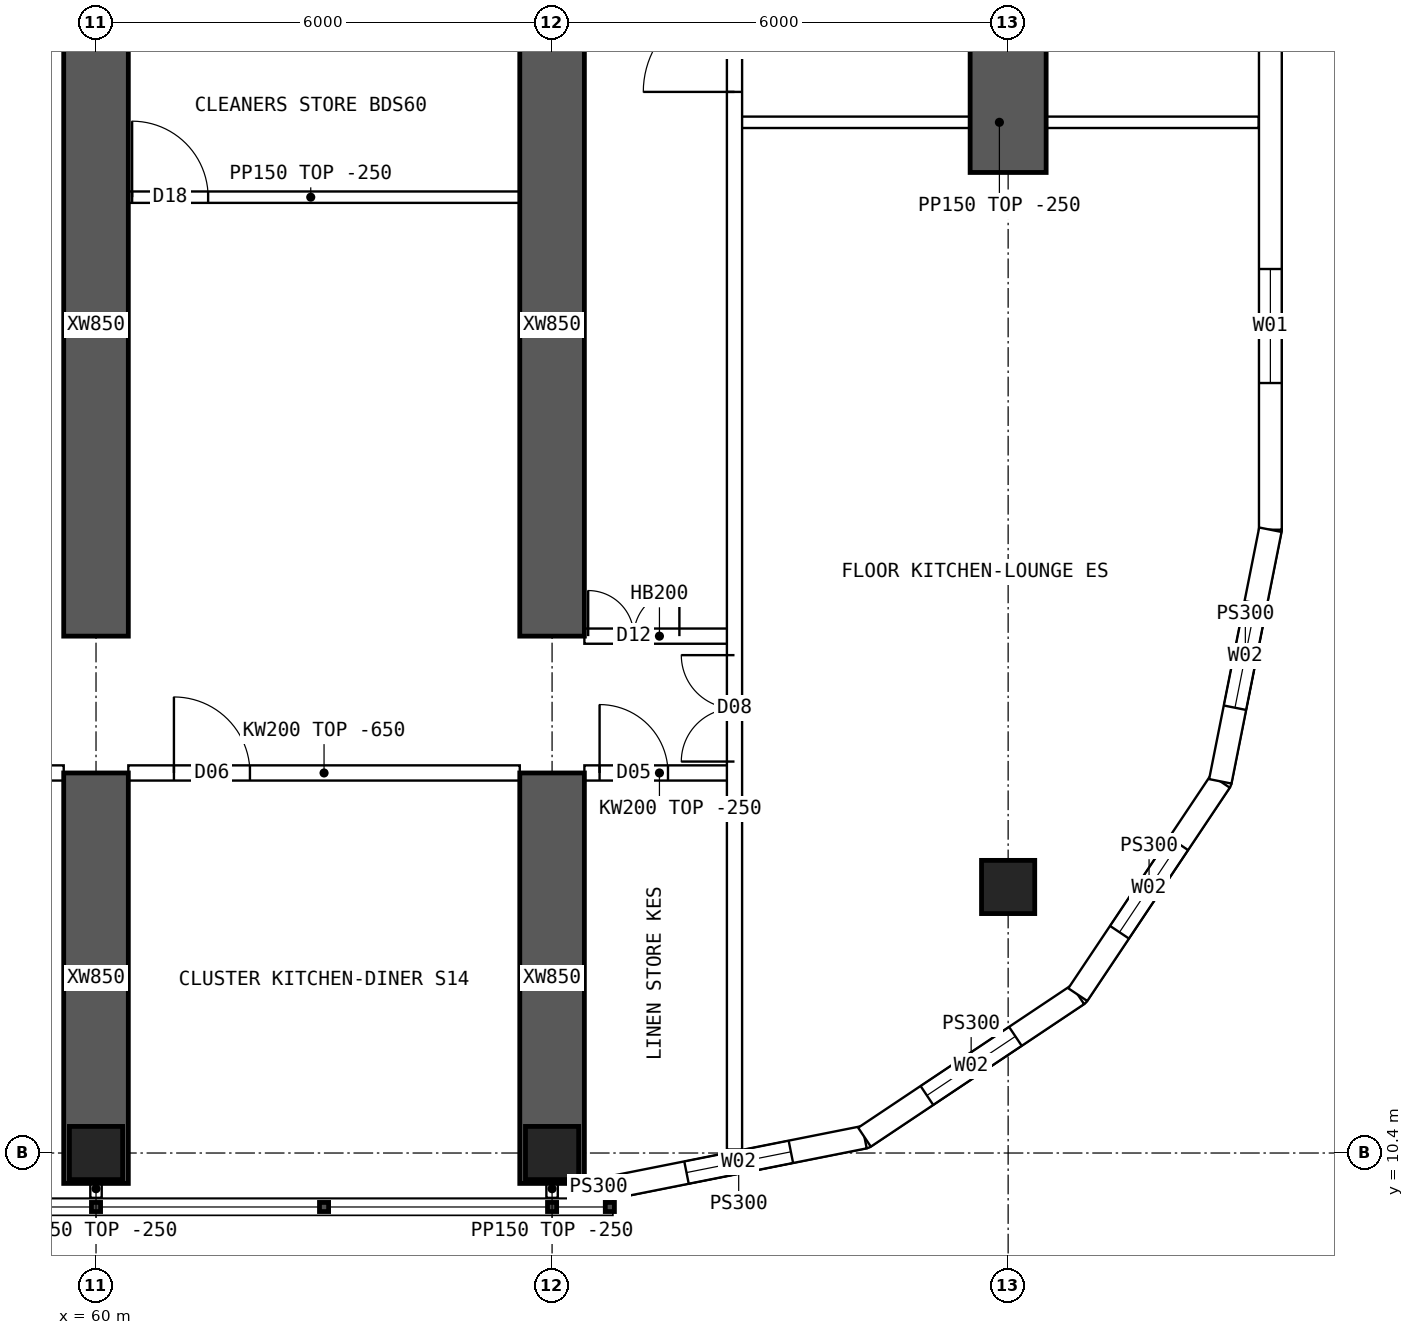
"""IFC4 building model, lengths in metres.
Left out: names, types, materials, properties, quantities, classifications, styles, units other than length and angle.
Written with IfcOpenShell. Run it as: python <this file> out.ifc"""

import sys

from ifc_helpers import new_model, si_unit, direction, frame, frame_2d, origin, origin_2d, place, context, subcontext, project, spatial, polyline, rectangle, hollow_rectangle, outline, extrude, element, fill, save


model = new_model("IFC4")
c1 = context("Model", 3, precision=1e-05, world=origin(), true_north=direction((0.0, 1.0)))
c2 = subcontext(c1, "Body", "Model", "MODEL_VIEW")
j1 = project(units=[si_unit("LENGTHUNIT", "METRE"), si_unit("PLANEANGLEUNIT", "RADIAN")], contexts=[c1])
p1 = place(None, origin())
s1 = spatial("IfcSite", under=j1, at=p1, CompositionType="ELEMENT")
p2 = place(p1, origin())
s2 = spatial("IfcBuilding", under=s1, at=p2, CompositionType="ELEMENT")
p3 = place(p2, frame((0.0, 0.0, 156.1)))
s3 = spatial("IfcBuildingStorey", under=s2, at=p3, CompositionType="ELEMENT", Elevation=156.1)
for number, where, z_axis, x_axis in (
    (1, (60.0, 10.4, 0.0), (0.0, 0.0, 1.0), (1.0, 0.0, 0.0)),
    (2, (66.0, 10.4, 0.0), (0.0, 0.0, 1.0), (1.0, 0.0, 0.0)),
    (3, (72.0, 13.9, 0.0), (0.0, 0.0, 1.0), (1.0, 0.0, 0.0)),
):
    element("IfcColumn", number, at=place(p3, frame(where, z_axis=z_axis, x_axis=x_axis)), inside=s3, PredefinedType="COLUMN", context=c2, shape_type="SweptSolid", body=[
        extrude(hollow_rectangle(XDim=0.7, YDim=0.7, WallThickness=0.07, at=origin_2d()), origin(), (0.0, 0.0, 1.0), 3.75),
    ])
p4 = place(p3, frame((72.0, 23.3, 0.0), z_axis=(0.0, 0.0, 1.0), x_axis=(0.0, 1.0, 0.0)))
e4 = element("IfcWall", 4, at=p4, inside=s3, PredefinedType="SHEAR", context=c2, shape_type="SweptSolid", body=[
    extrude(rectangle(XDim=5.0, YDim=1.0, at=frame_2d((2.5, 0.0))), origin(), (0.0, 0.0, 1.0), 3.75),
])
p5 = place(p3, frame((60.0, 10.0, 0.0), z_axis=(0.0, 0.0, 1.0), x_axis=(0.0, 1.0, 0.0)))
e5 = element("IfcWall", 5, at=p5, inside=s3, PredefinedType="SHEAR", context=c2, shape_type="SweptSolid", body=[
    extrude(rectangle(XDim=5.4, YDim=0.85, at=frame_2d((2.7, 0.0))), origin(), (0.0, 0.0, 1.0), 3.75),
])
p6 = place(p3, frame((60.0, 17.2, 0.0), z_axis=(0.0, 0.0, 1.0), x_axis=(0.0, 1.0, 0.0)))
e6 = element("IfcWall", 6, at=p6, inside=s3, PredefinedType="SHEAR", context=c2, shape_type="SweptSolid", body=[
    extrude(rectangle(XDim=8.175, YDim=0.85, at=frame_2d((4.087, 0.0))), origin(), (0.0, 0.0, 1.0), 3.75),
])
p7 = place(p3, frame((66.0, 10.0, 0.0), z_axis=(0.0, 0.0, 1.0), x_axis=(0.0, 1.0, 0.0)))
e7 = element("IfcWall", 7, at=p7, inside=s3, PredefinedType="SHEAR", context=c2, shape_type="SweptSolid", body=[
    extrude(rectangle(XDim=5.4, YDim=0.85, at=frame_2d((2.7, 0.0))), origin(), (0.0, 0.0, 1.0), 3.75),
])
p8 = place(p3, frame((66.0, 17.2, 0.0), z_axis=(0.0, 0.0, 1.0), x_axis=(0.0, 1.0, 0.0)))
e8 = element("IfcWall", 8, at=p8, inside=s3, PredefinedType="SHEAR", context=c2, shape_type="SweptSolid", body=[
    extrude(rectangle(XDim=8.175, YDim=0.85, at=frame_2d((4.087, 0.0))), origin(), (0.0, 0.0, 1.0), 3.75),
])
p9 = place(p3, frame((75.45, 18.6, 0.0), z_axis=(0.0, 0.0, 1.0), x_axis=(0.0, 1.0, 0.0)))
e9 = element("IfcWall", 9, at=p9, inside=s3, PredefinedType="SOLIDWALL", context=c2, shape_type="SweptSolid", body=[
    extrude(outline(polyline([(-0.015, -0.15), (26.815, -0.15), (26.785, 0.15), (0.015, 0.15), (-0.015, -0.15)])), origin(), (0.0, 0.0, 1.0), 3.5),
])
p10 = place(p9, frame((1.93, 0.0, 0.9)))
e10 = element("IfcOpeningElement", 10, at=p10, cuts=e9, PredefinedType="OPENING", context=c2, shape_type="SweptSolid", body=[
    extrude(rectangle(XDim=1.5, YDim=2.0, at=frame_2d((0.75, 1.0))), frame((0.0, 0.16, 0.0), z_axis=(0.0, -1.0, 0.0), x_axis=(1.0, 0.0, 0.0)), (0.0, 0.0, 1.0), 0.32),
])
p11 = place(p9, frame((7.29, 0.0, 0.9)))
e11 = element("IfcOpeningElement", 11, at=p11, cuts=e9, PredefinedType="OPENING", context=c2, shape_type="SweptSolid", body=[
    extrude(rectangle(XDim=1.5, YDim=2.0, at=frame_2d((0.75, 1.0))), frame((0.0, 0.16, 0.0), z_axis=(0.0, -1.0, 0.0), x_axis=(1.0, 0.0, 0.0)), (0.0, 0.0, 1.0), 0.32),
])
p12 = place(p9, frame((12.65, 0.0, 0.9)))
e12 = element("IfcOpeningElement", 12, at=p12, cuts=e9, PredefinedType="OPENING", context=c2, shape_type="SweptSolid", body=[
    extrude(rectangle(XDim=1.5, YDim=2.0, at=frame_2d((0.75, 1.0))), frame((0.0, 0.16, 0.0), z_axis=(0.0, -1.0, 0.0), x_axis=(1.0, 0.0, 0.0)), (0.0, 0.0, 1.0), 0.32),
])
p13 = place(p9, frame((18.01, 0.0, 0.9)))
e13 = element("IfcOpeningElement", 13, at=p13, cuts=e9, PredefinedType="OPENING", context=c2, shape_type="SweptSolid", body=[
    extrude(rectangle(XDim=1.5, YDim=2.0, at=frame_2d((0.75, 1.0))), frame((0.0, 0.16, 0.0), z_axis=(0.0, -1.0, 0.0), x_axis=(1.0, 0.0, 0.0)), (0.0, 0.0, 1.0), 0.32),
])
p14 = place(p9, frame((23.37, 0.0, 0.9)))
e14 = element("IfcOpeningElement", 14, at=p14, cuts=e9, PredefinedType="OPENING", context=c2, shape_type="SweptSolid", body=[
    extrude(rectangle(XDim=1.5, YDim=2.0, at=frame_2d((0.75, 1.0))), frame((0.0, 0.16, 0.0), z_axis=(0.0, -1.0, 0.0), x_axis=(1.0, 0.0, 0.0)), (0.0, 0.0, 1.0), 0.32),
])
p15 = place(p3, frame((66.8, 9.95, 0.0), z_axis=(0.0, 0.0, 1.0), x_axis=(0.98078325777, 0.195100490205, 0.0)))
e15 = element("IfcWall", 15, at=p15, inside=s3, PredefinedType="SOLIDWALL", context=c2, shape_type="SweptSolid", body=[
    extrude(outline(polyline([(-0.03, -0.15), (3.405, -0.15), (3.345, 0.15), (0.03, 0.15), (-0.03, -0.15)])), origin(), (0.0, 0.0, 1.0), 3.5),
])
p16 = place(p15, frame((0.988, 0.0, 0.9)))
e16 = element("IfcOpeningElement", 16, at=p16, cuts=e15, PredefinedType="OPENING", context=c2, shape_type="SweptSolid", body=[
    extrude(rectangle(XDim=1.4, YDim=1.8, at=frame_2d((0.7, 0.9))), frame((0.0, 0.16, 0.0), z_axis=(0.0, -1.0, 0.0), x_axis=(1.0, 0.0, 0.0)), (0.0, 0.0, 1.0), 0.32),
])
p17 = place(p3, frame((70.11, 10.608, 0.0), z_axis=(0.0, 0.0, 1.0), x_axis=(0.831493450887, 0.555534554399, 0.0)))
e17 = element("IfcWall", 17, at=p17, inside=s3, PredefinedType="SOLIDWALL", context=c2, shape_type="SweptSolid", body=[
    extrude(outline(polyline([(-0.03, -0.15), (3.405, -0.15), (3.345, 0.15), (0.03, 0.15), (-0.03, -0.15)])), origin(), (0.0, 0.0, 1.0), 3.5),
])
p18 = place(p17, frame((0.988, 0.0, 0.9)))
e18 = element("IfcOpeningElement", 18, at=p18, cuts=e17, PredefinedType="OPENING", context=c2, shape_type="SweptSolid", body=[
    extrude(rectangle(XDim=1.4, YDim=1.8, at=frame_2d((0.7, 0.9))), frame((0.0, 0.16, 0.0), z_axis=(0.0, -1.0, 0.0), x_axis=(1.0, 0.0, 0.0)), (0.0, 0.0, 1.0), 0.32),
])
p19 = place(p3, frame((72.917, 12.483, 0.0), z_axis=(0.0, 0.0, 1.0), x_axis=(0.555534554399, 0.831493450887, 0.0)))
e19 = element("IfcWall", 19, at=p19, inside=s3, PredefinedType="SOLIDWALL", context=c2, shape_type="SweptSolid", body=[
    extrude(outline(polyline([(-0.03, -0.15), (3.405, -0.15), (3.345, 0.15), (0.03, 0.15), (-0.03, -0.15)])), origin(), (0.0, 0.0, 1.0), 3.5),
])
p20 = place(p19, frame((0.988, 0.0, 0.9)))
e20 = element("IfcOpeningElement", 20, at=p20, cuts=e19, PredefinedType="OPENING", context=c2, shape_type="SweptSolid", body=[
    extrude(rectangle(XDim=1.4, YDim=1.8, at=frame_2d((0.7, 0.9))), frame((0.0, 0.16, 0.0), z_axis=(0.0, -1.0, 0.0), x_axis=(1.0, 0.0, 0.0)), (0.0, 0.0, 1.0), 0.32),
])
p21 = place(p3, frame((74.792, 15.29, 0.0), z_axis=(0.0, 0.0, 1.0), x_axis=(0.19508664885, 0.980786011034, 0.0)))
e21 = element("IfcWall", 21, at=p21, inside=s3, PredefinedType="SOLIDWALL", context=c2, shape_type="SweptSolid", body=[
    extrude(outline(polyline([(-0.03, -0.15), (3.39, -0.15), (3.36, 0.15), (0.03, 0.15), (-0.03, -0.15)])), origin(), (0.0, 0.0, 1.0), 3.5),
])
p22 = place(p21, frame((0.988, 0.0, 0.9)))
e22 = element("IfcOpeningElement", 22, at=p22, cuts=e21, PredefinedType="OPENING", context=c2, shape_type="SweptSolid", body=[
    extrude(rectangle(XDim=1.4, YDim=1.8, at=frame_2d((0.7, 0.9))), frame((0.0, 0.16, 0.0), z_axis=(0.0, -1.0, 0.0), x_axis=(1.0, 0.0, 0.0)), (0.0, 0.0, 1.0), 0.32),
])
p23 = place(p3, frame((66.8, 9.95, 0.0), z_axis=(0.0, 0.0, 1.0), x_axis=(-1.0, 0.0, 0.0)))
e23 = element("IfcWall", 23, at=p23, inside=s3, PredefinedType="SOLIDWALL", context=c2, shape_type="SweptSolid", body=[
    extrude(rectangle(XDim=0.375, YDim=0.3, at=frame_2d((0.188, 0.0))), origin(), (0.0, 0.0, 1.0), 3.5),
])
p24 = place(p3, frame((54.425, 15.4, 0.0), z_axis=(0.0, 0.0, 1.0), x_axis=(1.0, 0.0, 0.0)))
e24 = element("IfcWall", 24, at=p24, inside=s3, PredefinedType="SOLIDWALL", context=c2, shape_type="SweptSolid", body=[
    extrude(outline(polyline([(0.0, 0.0), (5.15, 0.0), (5.15, 3.1), (0.0, 3.1), (0.0, 0.0)])), frame((0.0, 0.1, 0.0), z_axis=(0.0, -1.0, 0.0), x_axis=(1.0, 0.0, 0.0)), (0.0, 0.0, 1.0), 0.2),
])
p25 = place(p24, frame((2.6, 0.0, 0.0)))
e25 = element("IfcOpeningElement", 25, at=p25, cuts=e24, PredefinedType="OPENING", context=c2, shape_type="SweptSolid", body=[
    extrude(rectangle(XDim=0.9, YDim=2.1, at=frame_2d((0.45, 1.05))), frame((0.0, 0.11, 0.0), z_axis=(0.0, -1.0, 0.0), x_axis=(1.0, 0.0, 0.0)), (0.0, 0.0, 1.0), 0.22),
])
p26 = place(p3, frame((60.425, 15.4, 0.0), z_axis=(0.0, 0.0, 1.0), x_axis=(1.0, 0.0, 0.0)))
e26 = element("IfcWall", 26, at=p26, inside=s3, PredefinedType="SOLIDWALL", context=c2, shape_type="SweptSolid", body=[
    extrude(outline(polyline([(0.0, 0.0), (5.15, 0.0), (5.15, 3.1), (0.0, 3.1), (0.0, 0.0)])), frame((0.0, 0.1, 0.0), z_axis=(0.0, -1.0, 0.0), x_axis=(1.0, 0.0, 0.0)), (0.0, 0.0, 1.0), 0.2),
])
p27 = place(p26, frame((0.6, 0.0, 0.0)))
e27 = element("IfcOpeningElement", 27, at=p27, cuts=e26, PredefinedType="OPENING", context=c2, shape_type="SweptSolid", body=[
    extrude(rectangle(XDim=1.0, YDim=2.1, at=frame_2d((0.5, 1.05))), frame((0.0, 0.11, 0.0), z_axis=(0.0, -1.0, 0.0), x_axis=(1.0, 0.0, 0.0)), (0.0, 0.0, 1.0), 0.22),
])
p28 = place(p3, frame((66.425, 15.4, 0.0), z_axis=(0.0, 0.0, 1.0), x_axis=(1.0, 0.0, 0.0)))
e28 = element("IfcWall", 28, at=p28, inside=s3, PredefinedType="SOLIDWALL", context=c2, shape_type="SweptSolid", body=[
    extrude(rectangle(XDim=1.975, YDim=0.2, at=frame_2d((0.987, 0.0))), origin(), (0.0, 0.0, 1.0), 3.5),
])
p29 = place(p28, frame((0.2, 0.0, 0.0)))
e29 = element("IfcOpeningElement", 29, at=p29, cuts=e28, PredefinedType="OPENING", context=c2, shape_type="SweptSolid", body=[
    extrude(rectangle(XDim=0.9, YDim=2.1, at=frame_2d((0.45, 1.05))), frame((0.0, 0.11, 0.0), z_axis=(0.0, -1.0, 0.0), x_axis=(1.0, 0.0, 0.0)), (0.0, 0.0, 1.0), 0.22),
])
p30 = place(p3, frame((66.425, 17.2, 0.0), z_axis=(0.0, 0.0, 1.0), x_axis=(1.0, 0.0, 0.0)))
e30 = element("IfcWall", 30, at=p30, inside=s3, PredefinedType="SOLIDWALL", context=c2, shape_type="SweptSolid", body=[
    extrude(rectangle(XDim=1.975, YDim=0.2, at=frame_2d((0.987, 0.0))), origin(), (0.0, 0.0, 1.0), 3.5),
])
p31 = place(p30, frame((0.05, 0.0, 0.0)))
e31 = element("IfcOpeningElement", 31, at=p31, cuts=e30, PredefinedType="OPENING", context=c2, shape_type="SweptSolid", body=[
    extrude(rectangle(XDim=1.2, YDim=2.1, at=frame_2d((0.6, 1.05))), frame((0.0, 0.11, 0.0), z_axis=(0.0, -1.0, 0.0), x_axis=(1.0, 0.0, 0.0)), (0.0, 0.0, 1.0), 0.22),
])
p32 = place(p3, frame((60.075, 22.975, 0.0), z_axis=(0.0, 0.0, 1.0), x_axis=(1.0, 0.0, 0.0)))
e32 = element("IfcWall", 32, at=p32, inside=s3, PredefinedType="PARTITIONING", context=c2, shape_type="SweptSolid", body=[
    extrude(rectangle(XDim=5.5, YDim=0.15, at=frame_2d((2.75, 0.0))), origin(), (0.0, 0.0, 1.0), 3.5),
])
p33 = place(p32, frame((0.4, 0.0, 0.0)))
e33 = element("IfcOpeningElement", 33, at=p33, cuts=e32, PredefinedType="OPENING", context=c2, shape_type="SweptSolid", body=[
    extrude(rectangle(XDim=1.0, YDim=2.1, at=frame_2d((0.5, 1.05))), frame((0.0, 0.085, 0.0), z_axis=(0.0, -1.0, 0.0), x_axis=(1.0, 0.0, 0.0)), (0.0, 0.0, 1.0), 0.17),
])
p34 = place(p3, frame((68.4, 10.446, 0.0), z_axis=(0.0, 0.0, 1.0), x_axis=(0.0, 1.0, 0.0)))
e34 = element("IfcWall", 34, at=p34, inside=s3, PredefinedType="SOLIDWALL", context=c2, shape_type="SweptSolid", body=[
    extrude(rectangle(XDim=43.107, YDim=0.2, at=frame_2d((21.554, 0.0))), origin(), (0.0, 0.0, 1.0), 3.5),
])
p35 = place(p34, frame((13.914, 0.0, 0.0)))
e35 = element("IfcOpeningElement", 35, at=p35, cuts=e34, PredefinedType="OPENING", context=c2, shape_type="SweptSolid", body=[
    extrude(rectangle(XDim=1.2, YDim=2.1, at=frame_2d((0.6, 1.05))), frame((0.0, 0.11, 0.0), z_axis=(0.0, -1.0, 0.0), x_axis=(1.0, 0.0, 0.0)), (0.0, 0.0, 1.0), 0.22),
])
p36 = place(p34, frame((22.634, 0.0, 0.0)))
e36 = element("IfcOpeningElement", 36, at=p36, cuts=e34, PredefinedType="OPENING", context=c2, shape_type="SweptSolid", body=[
    extrude(rectangle(XDim=1.2, YDim=2.1, at=frame_2d((0.6, 1.05))), frame((0.0, 0.11, 0.0), z_axis=(0.0, -1.0, 0.0), x_axis=(1.0, 0.0, 0.0)), (0.0, 0.0, 1.0), 0.22),
])
p37 = place(p34, frame((5.104, 0.0, 0.0)))
e37 = element("IfcOpeningElement", 37, at=p37, cuts=e34, PredefinedType="OPENING", context=c2, shape_type="SweptSolid", body=[
    extrude(rectangle(XDim=1.4, YDim=2.1, at=frame_2d((0.7, 1.05))), frame((0.0, 0.11, 0.0), z_axis=(0.0, -1.0, 0.0), x_axis=(1.0, 0.0, 0.0)), (0.0, 0.0, 1.0), 0.22),
])
p38 = place(p34, frame((36.504, 0.0, 0.0)))
e38 = element("IfcOpeningElement", 38, at=p38, cuts=e34, PredefinedType="OPENING", context=c2, shape_type="SweptSolid", body=[
    extrude(rectangle(XDim=1.4, YDim=2.1, at=frame_2d((0.7, 1.05))), frame((0.0, 0.11, 0.0), z_axis=(0.0, -1.0, 0.0), x_axis=(1.0, 0.0, 0.0)), (0.0, 0.0, 1.0), 0.22),
])
p39 = place(p3, frame((68.475, 23.96, 0.0), z_axis=(0.0, 0.0, 1.0), x_axis=(1.0, 0.0, 0.0)))
e39 = element("IfcWall", 39, at=p39, inside=s3, PredefinedType="PARTITIONING", context=c2, shape_type="SweptSolid", body=[
    extrude(rectangle(XDim=6.82, YDim=0.15, at=frame_2d((3.41, 0.0))), origin(), (0.0, 0.0, 1.0), 3.5),
])
for number, where, z_axis, x_axis in (
    (40, (60.0, 10.05, 0.0), (0.0, 0.0, 1.0), (0.0, -1.0, 0.0)),
    (41, (66.0, 10.05, 0.0), (0.0, 0.0, 1.0), (0.0, -1.0, 0.0)),
):
    element("IfcWall", number, at=place(p3, frame(where, z_axis=z_axis, x_axis=x_axis)), inside=s3, PredefinedType="PARTITIONING", context=c2, shape_type="SweptSolid", body=[
        extrude(rectangle(XDim=0.24, YDim=0.15, at=frame_2d((0.12, 0.0))), origin(), (0.0, 0.0, 1.0), 3.5),
    ])
p40 = place(p10, origin())
e42 = element("IfcWindow", 42, at=p40, inside=s3, PartitioningType="SINGLE_PANEL", PredefinedType="WINDOW", context=c2, shape_type="SweptSolid", body=[
    extrude(rectangle(XDim=1.5, YDim=2.0, at=frame_2d((0.75, 1.0))), frame((0.0, 0.03, 0.0), z_axis=(0.0, -1.0, 0.0), x_axis=(1.0, 0.0, 0.0)), (0.0, 0.0, 1.0), 0.06),
])
fill(e10, e42)
p41 = place(p16, origin())
e43 = element("IfcWindow", 43, at=p41, inside=s3, PartitioningType="SINGLE_PANEL", PredefinedType="WINDOW", context=c2, shape_type="SweptSolid", body=[
    extrude(rectangle(XDim=1.4, YDim=1.8, at=frame_2d((0.7, 0.9))), frame((0.0, 0.03, 0.0), z_axis=(0.0, -1.0, 0.0), x_axis=(1.0, 0.0, 0.0)), (0.0, 0.0, 1.0), 0.06),
])
fill(e16, e43)
p42 = place(p18, origin())
e44 = element("IfcWindow", 44, at=p42, inside=s3, PartitioningType="SINGLE_PANEL", PredefinedType="WINDOW", context=c2, shape_type="SweptSolid", body=[
    extrude(rectangle(XDim=1.4, YDim=1.8, at=frame_2d((0.7, 0.9))), frame((0.0, 0.03, 0.0), z_axis=(0.0, -1.0, 0.0), x_axis=(1.0, 0.0, 0.0)), (0.0, 0.0, 1.0), 0.06),
])
fill(e18, e44)
p43 = place(p20, origin())
e45 = element("IfcWindow", 45, at=p43, inside=s3, PartitioningType="SINGLE_PANEL", PredefinedType="WINDOW", context=c2, shape_type="SweptSolid", body=[
    extrude(rectangle(XDim=1.4, YDim=1.8, at=frame_2d((0.7, 0.9))), frame((0.0, 0.03, 0.0), z_axis=(0.0, -1.0, 0.0), x_axis=(1.0, 0.0, 0.0)), (0.0, 0.0, 1.0), 0.06),
])
fill(e20, e45)
p44 = place(p22, origin())
e46 = element("IfcWindow", 46, at=p44, inside=s3, PartitioningType="SINGLE_PANEL", PredefinedType="WINDOW", context=c2, shape_type="SweptSolid", body=[
    extrude(rectangle(XDim=1.4, YDim=1.8, at=frame_2d((0.7, 0.9))), frame((0.0, 0.03, 0.0), z_axis=(0.0, -1.0, 0.0), x_axis=(1.0, 0.0, 0.0)), (0.0, 0.0, 1.0), 0.06),
])
fill(e22, e46)
p45 = place(p31, origin())
e47 = element("IfcDoor", 47, at=p45, inside=s3, OperationType="DOUBLE_DOOR_SINGLE_SWING", PredefinedType="DOOR", context=c2, shape_type="SweptSolid", body=[
    extrude(rectangle(XDim=1.2, YDim=2.1, at=frame_2d((0.6, 1.05))), frame((0.0, 0.025, 0.0), z_axis=(0.0, -1.0, 0.0), x_axis=(1.0, 0.0, 0.0)), (0.0, 0.0, 1.0), 0.05),
])
fill(e31, e47)
p46 = place(p27, origin())
e48 = element("IfcDoor", 48, at=p46, inside=s3, OperationType="SINGLE_SWING_LEFT", PredefinedType="DOOR", context=c2, shape_type="SweptSolid", body=[
    extrude(rectangle(XDim=1.0, YDim=2.1, at=frame_2d((0.5, 1.05))), frame((0.0, 0.025, 0.0), z_axis=(0.0, -1.0, 0.0), x_axis=(1.0, 0.0, 0.0)), (0.0, 0.0, 1.0), 0.05),
])
fill(e27, e48)
p47 = place(p33, origin())
e49 = element("IfcDoor", 49, at=p47, inside=s3, OperationType="SINGLE_SWING_LEFT", PredefinedType="DOOR", context=c2, shape_type="SweptSolid", body=[
    extrude(rectangle(XDim=1.0, YDim=2.1, at=frame_2d((0.5, 1.05))), frame((0.0, 0.025, 0.0), z_axis=(0.0, -1.0, 0.0), x_axis=(1.0, 0.0, 0.0)), (0.0, 0.0, 1.0), 0.05),
])
fill(e33, e49)
p48 = place(p35, origin())
e50 = element("IfcDoor", 50, at=p48, inside=s3, OperationType="SINGLE_SWING_LEFT", PredefinedType="DOOR", context=c2, shape_type="SweptSolid", body=[
    extrude(rectangle(XDim=1.2, YDim=2.1, at=frame_2d((0.6, 1.05))), frame((0.0, 0.025, 0.0), z_axis=(0.0, -1.0, 0.0), x_axis=(1.0, 0.0, 0.0)), (0.0, 0.0, 1.0), 0.05),
])
fill(e35, e50)
p49 = place(p37, origin())
e51 = element("IfcDoor", 51, at=p49, inside=s3, OperationType="DOUBLE_DOOR_SINGLE_SWING", PredefinedType="DOOR", context=c2, shape_type="SweptSolid", body=[
    extrude(rectangle(XDim=1.4, YDim=2.1, at=frame_2d((0.7, 1.05))), frame((0.0, 0.025, 0.0), z_axis=(0.0, -1.0, 0.0), x_axis=(1.0, 0.0, 0.0)), (0.0, 0.0, 1.0), 0.05),
])
fill(e37, e51)
p50 = place(p29, origin())
e52 = element("IfcDoor", 52, at=p50, inside=s3, OperationType="SINGLE_SWING_LEFT", PredefinedType="DOOR", context=c2, shape_type="SweptSolid", body=[
    extrude(rectangle(XDim=0.9, YDim=2.1, at=frame_2d((0.45, 1.05))), frame((0.0, 0.025, 0.0), z_axis=(0.0, -1.0, 0.0), x_axis=(1.0, 0.0, 0.0)), (0.0, 0.0, 1.0), 0.05),
])
fill(e29, e52)
save(model, sys.argv[1])
